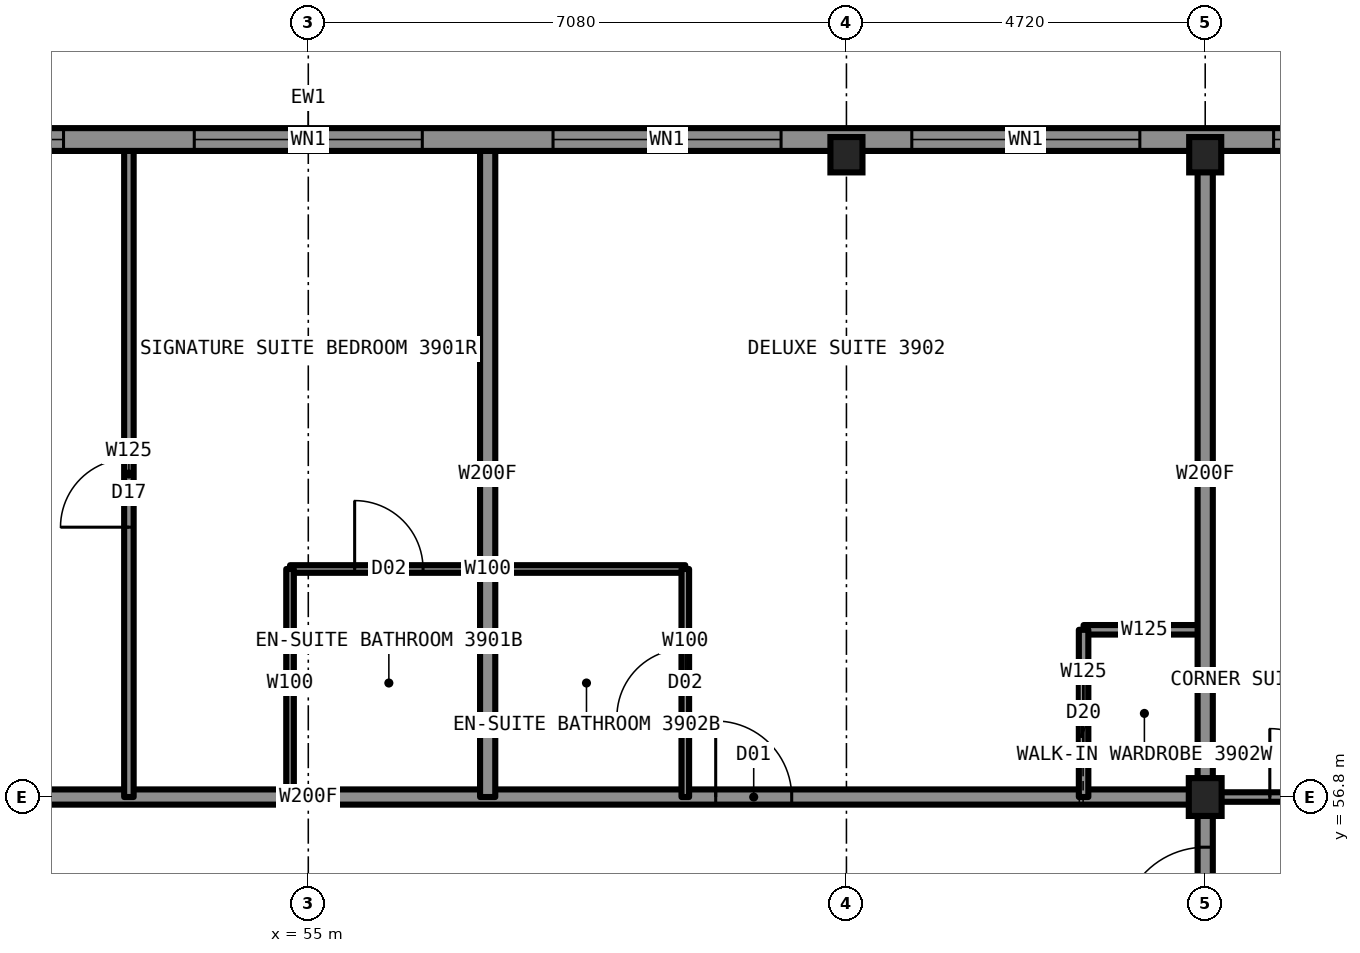
"""IFC4 building model, lengths in metres.
Left out: names, types, materials, properties, quantities, classifications, styles, units other than length and angle.
Written with IfcOpenShell. Run it as: python <this file> out.ifc"""

import sys

from ifc_helpers import new_model, si_unit, direction, frame, frame_2d, origin, origin_2d, place, context, subcontext, project, spatial, rectangle, i_section, extrude, element, fill, save


model = new_model("IFC4")
c1 = context("Model", 3, precision=1e-05, world=origin(), true_north=direction((0.0, 1.0)))
c2 = subcontext(c1, "Body", "Model", "MODEL_VIEW")
j1 = project(units=[si_unit("LENGTHUNIT", "METRE"), si_unit("PLANEANGLEUNIT", "RADIAN")], contexts=[c1])
p1 = place(None, origin())
s1 = spatial("IfcSite", under=j1, at=p1, CompositionType="ELEMENT")
p2 = place(p1, origin())
s2 = spatial("IfcBuilding", under=s1, at=p2, CompositionType="ELEMENT")
p3 = place(p2, frame((0.0, 0.0, 145.9)))
s3 = spatial("IfcBuildingStorey", under=s2, at=p3, CompositionType="ELEMENT", Elevation=145.9)
for number, where, z_axis, x_axis in (
    (1, (62.08, 65.25, 0.0), (0.0, 0.0, 1.0), (1.0, 0.0, 0.0)),
    (2, (66.8, 65.25, 0.0), (0.0, 0.0, 1.0), (1.0, 0.0, 0.0)),
):
    element("IfcColumn", number, at=place(p3, frame(where, z_axis=z_axis, x_axis=x_axis)), inside=s3, PredefinedType="COLUMN", context=c2, shape_type="SweptSolid", body=[
        extrude(i_section(OverallWidth=0.422, OverallDepth=0.465, WebThickness=0.045, FlangeThickness=0.073, at=origin_2d()), origin(), (0.0, 0.0, 1.0), 3.5),
    ])
p4 = place(p3, frame((66.8, 56.8, 0.0), z_axis=(0.0, 0.0, 1.0), x_axis=(1.0, 0.0, 0.0)))
e3 = element("IfcColumn", 3, at=p4, inside=s3, PredefinedType="COLUMN", context=c2, shape_type="SweptSolid", body=[
    extrude(i_section(OverallWidth=0.432, OverallDepth=0.498, WebThickness=0.056, FlangeThickness=0.089, at=origin_2d()), origin(), (0.0, 0.0, 1.0), 3.5),
])
p5 = place(p3, frame((43.2, 56.8, 0.0), z_axis=(0.0, 0.0, 1.0), x_axis=(1.0, 0.0, 0.0)))
e4 = element("IfcWall", 4, at=p5, inside=s3, PredefinedType="PARTITIONING", context=c2, shape_type="SweptSolid", body=[
    extrude(rectangle(XDim=23.6, YDim=0.2, at=frame_2d((11.8, 0.0))), origin(), (0.0, 0.0, 1.0), 3.33),
])
p6 = place(p5, frame((1.85, 0.0, 0.0)))
e5 = element("IfcOpeningElement", 5, at=p6, cuts=e4, PredefinedType="OPENING", context=c2, shape_type="SweptSolid", body=[
    extrude(rectangle(XDim=1.1, YDim=2.2, at=frame_2d((0.55, 1.1))), frame((0.0, 0.11, 0.0), z_axis=(0.0, -1.0, 0.0), x_axis=(1.0, 0.0, 0.0)), (0.0, 0.0, 1.0), 0.22),
])
p7 = place(p5, frame((17.16, 0.0, 0.0)))
e6 = element("IfcOpeningElement", 6, at=p7, cuts=e4, PredefinedType="OPENING", context=c2, shape_type="SweptSolid", body=[
    extrude(rectangle(XDim=1.0, YDim=2.2, at=frame_2d((0.5, 1.1))), frame((0.0, 0.11, 0.0), z_axis=(0.0, -1.0, 0.0), x_axis=(1.0, 0.0, 0.0)), (0.0, 0.0, 1.0), 0.22),
])
p8 = place(p3, frame((66.8, 56.8, 0.0), z_axis=(0.0, 0.0, 1.0), x_axis=(1.0, 0.0, 0.0)))
e7 = element("IfcWall", 7, at=p8, inside=s3, PredefinedType="PARTITIONING", context=c2, shape_type="SweptSolid", body=[
    extrude(rectangle(XDim=8.5, YDim=0.125, at=frame_2d((4.25, 0.0))), origin(), (0.0, 0.0, 1.0), 2.573),
])
p9 = place(p8, frame((0.85, 0.0, 0.0)))
e8 = element("IfcOpeningElement", 8, at=p9, cuts=e7, PredefinedType="OPENING", context=c2, shape_type="SweptSolid", body=[
    extrude(rectangle(XDim=0.9, YDim=2.2, at=frame_2d((0.45, 1.1))), frame((0.0, 0.073, 0.0), z_axis=(0.0, -1.0, 0.0), x_axis=(1.0, 0.0, 0.0)), (0.0, 0.0, 1.0), 0.145),
])
p10 = place(p3, frame((65.2, 59.0, 0.0), z_axis=(0.0, 0.0, 1.0), x_axis=(1.0, 0.0, 0.0)))
e9 = element("IfcWall", 9, at=p10, inside=s3, PredefinedType="PARTITIONING", context=c2, shape_type="SweptSolid", body=[
    extrude(rectangle(XDim=1.6, YDim=0.125, at=frame_2d((0.8, 0.0))), origin(), (0.0, 0.0, 1.0), 3.33),
])
p11 = place(p3, frame((54.76, 59.8, 0.0), z_axis=(0.0, 0.0, 1.0), x_axis=(1.0, 0.0, 0.0)))
e10 = element("IfcWall", 10, at=p11, inside=s3, PredefinedType="PARTITIONING", context=c2, shape_type="SweptSolid", body=[
    extrude(rectangle(XDim=5.2, YDim=0.1, at=frame_2d((2.6, 0.0))), origin(), (0.0, 0.0, 1.0), 3.33),
])
p12 = place(p11, frame((0.85, 0.0, 0.0)))
e11 = element("IfcOpeningElement", 11, at=p12, cuts=e10, PredefinedType="OPENING", context=c2, shape_type="SweptSolid", body=[
    extrude(rectangle(XDim=0.9, YDim=2.1, at=frame_2d((0.45, 1.05))), frame((0.0, 0.06, 0.0), z_axis=(0.0, -1.0, 0.0), x_axis=(1.0, 0.0, 0.0)), (0.0, 0.0, 1.0), 0.12),
])
p13 = place(p3, frame((54.76, 56.8, 0.0), z_axis=(0.0, 0.0, 1.0), x_axis=(0.0, 1.0, 0.0)))
e12 = element("IfcWall", 12, at=p13, inside=s3, PredefinedType="PARTITIONING", context=c2, shape_type="SweptSolid", body=[
    extrude(rectangle(XDim=3.0, YDim=0.1, at=frame_2d((1.5, 0.0))), origin(), (0.0, 0.0, 1.0), 3.33),
])
p14 = place(p3, frame((52.64, 56.8, 0.0), z_axis=(0.0, 0.0, 1.0), x_axis=(0.0, 1.0, 0.0)))
e13 = element("IfcWall", 13, at=p14, inside=s3, PredefinedType="PARTITIONING", context=c2, shape_type="SweptSolid", body=[
    extrude(rectangle(XDim=8.5, YDim=0.125, at=frame_2d((4.25, 0.0))), origin(), (0.0, 0.0, 1.0), 3.33),
])
p15 = place(p14, frame((3.55, 0.0, 0.0)))
e14 = element("IfcOpeningElement", 14, at=p15, cuts=e13, PredefinedType="OPENING", context=c2, shape_type="SweptSolid", body=[
    extrude(rectangle(XDim=0.9, YDim=2.2, at=frame_2d((0.45, 1.1))), frame((0.0, 0.073, 0.0), z_axis=(0.0, -1.0, 0.0), x_axis=(1.0, 0.0, 0.0)), (0.0, 0.0, 1.0), 0.145),
])
p16 = place(p3, frame((65.2, 56.8, 0.0), z_axis=(0.0, 0.0, 1.0), x_axis=(0.0, 1.0, 0.0)))
e15 = element("IfcWall", 15, at=p16, inside=s3, PredefinedType="PARTITIONING", context=c2, shape_type="SweptSolid", body=[
    extrude(rectangle(XDim=2.2, YDim=0.125, at=frame_2d((1.1, 0.0))), origin(), (0.0, 0.0, 1.0), 3.33),
])
p17 = place(p16, frame((0.7, 0.0, 0.0)))
e16 = element("IfcOpeningElement", 16, at=p17, cuts=e15, PredefinedType="OPENING", context=c2, shape_type="SweptSolid", body=[
    extrude(rectangle(XDim=0.8, YDim=2.1, at=frame_2d((0.4, 1.05))), frame((0.0, 0.073, 0.0), z_axis=(0.0, -1.0, 0.0), x_axis=(1.0, 0.0, 0.0)), (0.0, 0.0, 1.0), 0.145),
])
p18 = place(p3, frame((66.8, 33.2, 0.0), z_axis=(0.0, 0.0, 1.0), x_axis=(0.0, 1.0, 0.0)))
e17 = element("IfcWall", 17, at=p18, inside=s3, PredefinedType="PARTITIONING", context=c2, shape_type="SweptSolid", body=[
    extrude(rectangle(XDim=23.6, YDim=0.2, at=frame_2d((11.8, 0.0))), origin(), (0.0, 0.0, 1.0), 3.33),
])
p19 = place(p18, frame((7.87, 0.0, 0.0)))
e18 = element("IfcOpeningElement", 18, at=p19, cuts=e17, PredefinedType="OPENING", context=c2, shape_type="SweptSolid", body=[
    extrude(rectangle(XDim=1.0, YDim=2.2, at=frame_2d((0.5, 1.1))), frame((0.0, 0.11, 0.0), z_axis=(0.0, -1.0, 0.0), x_axis=(1.0, 0.0, 0.0)), (0.0, 0.0, 1.0), 0.22),
])
p20 = place(p18, frame((11.7, 0.0, 0.0)))
e19 = element("IfcOpeningElement", 19, at=p20, cuts=e17, PredefinedType="OPENING", context=c2, shape_type="SweptSolid", body=[
    extrude(rectangle(XDim=1.0, YDim=2.2, at=frame_2d((0.5, 1.1))), frame((0.0, 0.11, 0.0), z_axis=(0.0, -1.0, 0.0), x_axis=(1.0, 0.0, 0.0)), (0.0, 0.0, 1.0), 0.22),
])
p21 = place(p18, frame((14.56, 0.0, 0.0)))
e20 = element("IfcOpeningElement", 20, at=p21, cuts=e17, PredefinedType="OPENING", context=c2, shape_type="SweptSolid", body=[
    extrude(rectangle(XDim=1.0, YDim=2.2, at=frame_2d((0.5, 1.1))), frame((0.0, 0.11, 0.0), z_axis=(0.0, -1.0, 0.0), x_axis=(1.0, 0.0, 0.0)), (0.0, 0.0, 1.0), 0.22),
])
p22 = place(p18, frame((21.84, 0.0, 0.0)))
e21 = element("IfcOpeningElement", 21, at=p22, cuts=e17, PredefinedType="OPENING", context=c2, shape_type="SweptSolid", body=[
    extrude(rectangle(XDim=1.1, YDim=2.2, at=frame_2d((0.55, 1.1))), frame((0.0, 0.11, 0.0), z_axis=(0.0, -1.0, 0.0), x_axis=(1.0, 0.0, 0.0)), (0.0, 0.0, 1.0), 0.22),
])
p23 = place(p18, frame((0.66, 0.0, 0.0)))
e22 = element("IfcOpeningElement", 22, at=p23, cuts=e17, PredefinedType="OPENING", context=c2, shape_type="SweptSolid", body=[
    extrude(rectangle(XDim=1.1, YDim=2.2, at=frame_2d((0.55, 1.1))), frame((0.0, 0.11, 0.0), z_axis=(0.0, -1.0, 0.0), x_axis=(1.0, 0.0, 0.0)), (0.0, 0.0, 1.0), 0.22),
])
p24 = place(p3, frame((66.8, 56.8, 0.0), z_axis=(0.0, 0.0, 1.0), x_axis=(0.0, 1.0, 0.0)))
e23 = element("IfcWall", 23, at=p24, inside=s3, PredefinedType="PARTITIONING", context=c2, shape_type="SweptSolid", body=[
    extrude(rectangle(XDim=8.5, YDim=0.2, at=frame_2d((4.25, 0.0))), origin(), (0.0, 0.0, 1.0), 2.573),
])
p25 = place(p3, frame((57.36, 56.8, 0.0), z_axis=(0.0, 0.0, 1.0), x_axis=(0.0, 1.0, 0.0)))
e24 = element("IfcWall", 24, at=p25, inside=s3, PredefinedType="PARTITIONING", context=c2, shape_type="SweptSolid", body=[
    extrude(rectangle(XDim=8.5, YDim=0.2, at=frame_2d((4.25, 0.0))), origin(), (0.0, 0.0, 1.0), 3.33),
])
p26 = place(p3, frame((59.96, 56.8, 0.0), z_axis=(0.0, 0.0, 1.0), x_axis=(0.0, 1.0, 0.0)))
e25 = element("IfcWall", 25, at=p26, inside=s3, PredefinedType="PARTITIONING", context=c2, shape_type="SweptSolid", body=[
    extrude(rectangle(XDim=3.0, YDim=0.1, at=frame_2d((1.5, 0.0))), origin(), (0.0, 0.0, 1.0), 3.33),
])
p27 = place(p26, frame((1.05, 0.0, 0.0)))
e26 = element("IfcOpeningElement", 26, at=p27, cuts=e25, PredefinedType="OPENING", context=c2, shape_type="SweptSolid", body=[
    extrude(rectangle(XDim=0.9, YDim=2.1, at=frame_2d((0.45, 1.05))), frame((0.0, 0.06, 0.0), z_axis=(0.0, -1.0, 0.0), x_axis=(1.0, 0.0, 0.0)), (0.0, 0.0, 1.0), 0.12),
])
p28 = place(p3, frame((70.1, 65.45, 0.0), z_axis=(0.0, 0.0, 1.0), x_axis=(-1.0, 0.0, 0.0)))
e27 = element("IfcWall", 27, at=p28, inside=s3, PredefinedType="SOLIDWALL", context=c2, shape_type="SweptSolid", body=[
    extrude(rectangle(XDim=30.2, YDim=0.3, at=frame_2d((15.1, 0.0))), origin(), (0.0, 0.0, 1.0), 2.83),
])
p29 = place(p28, frame((1.3, 0.0, 0.8)))
e28 = element("IfcOpeningElement", 28, at=p29, cuts=e27, PredefinedType="OPENING", context=c2, shape_type="SweptSolid", body=[
    extrude(rectangle(XDim=1.1, YDim=1.7, at=frame_2d((0.55, 0.85))), frame((0.0, 0.16, 0.0), z_axis=(0.0, -1.0, 0.0), x_axis=(1.0, 0.0, 0.0)), (0.0, 0.0, 1.0), 0.32),
])
p30 = place(p28, frame((4.16, 0.0, 0.5)))
e29 = element("IfcOpeningElement", 29, at=p30, cuts=e27, PredefinedType="OPENING", context=c2, shape_type="SweptSolid", body=[
    extrude(rectangle(XDim=3.0, YDim=2.0, at=frame_2d((1.5, 1.0))), frame((0.0, 0.16, 0.0), z_axis=(0.0, -1.0, 0.0), x_axis=(1.0, 0.0, 0.0)), (0.0, 0.0, 1.0), 0.32),
])
p31 = place(p28, frame((8.88, 0.0, 0.5)))
e30 = element("IfcOpeningElement", 30, at=p31, cuts=e27, PredefinedType="OPENING", context=c2, shape_type="SweptSolid", body=[
    extrude(rectangle(XDim=3.0, YDim=2.0, at=frame_2d((1.5, 1.0))), frame((0.0, 0.16, 0.0), z_axis=(0.0, -1.0, 0.0), x_axis=(1.0, 0.0, 0.0)), (0.0, 0.0, 1.0), 0.32),
])
p32 = place(p28, frame((13.6, 0.0, 0.5)))
e31 = element("IfcOpeningElement", 31, at=p32, cuts=e27, PredefinedType="OPENING", context=c2, shape_type="SweptSolid", body=[
    extrude(rectangle(XDim=3.0, YDim=2.0, at=frame_2d((1.5, 1.0))), frame((0.0, 0.16, 0.0), z_axis=(0.0, -1.0, 0.0), x_axis=(1.0, 0.0, 0.0)), (0.0, 0.0, 1.0), 0.32),
])
p33 = place(p28, frame((18.32, 0.0, 0.5)))
e32 = element("IfcOpeningElement", 32, at=p33, cuts=e27, PredefinedType="OPENING", context=c2, shape_type="SweptSolid", body=[
    extrude(rectangle(XDim=3.0, YDim=2.0, at=frame_2d((1.5, 1.0))), frame((0.0, 0.16, 0.0), z_axis=(0.0, -1.0, 0.0), x_axis=(1.0, 0.0, 0.0)), (0.0, 0.0, 1.0), 0.32),
])
p34 = place(p28, frame((23.04, 0.0, 0.5)))
e33 = element("IfcOpeningElement", 33, at=p34, cuts=e27, PredefinedType="OPENING", context=c2, shape_type="SweptSolid", body=[
    extrude(rectangle(XDim=3.0, YDim=2.0, at=frame_2d((1.5, 1.0))), frame((0.0, 0.16, 0.0), z_axis=(0.0, -1.0, 0.0), x_axis=(1.0, 0.0, 0.0)), (0.0, 0.0, 1.0), 0.32),
])
p35 = place(p28, frame((27.75, 0.0, 0.8)))
e34 = element("IfcOpeningElement", 34, at=p35, cuts=e27, PredefinedType="OPENING", context=c2, shape_type="SweptSolid", body=[
    extrude(rectangle(XDim=1.1, YDim=1.7, at=frame_2d((0.55, 0.85))), frame((0.0, 0.16, 0.0), z_axis=(0.0, -1.0, 0.0), x_axis=(1.0, 0.0, 0.0)), (0.0, 0.0, 1.0), 0.32),
])
p36 = place(p12, origin())
e35 = element("IfcDoor", 35, at=p36, inside=s3, OperationType="SINGLE_SWING_RIGHT", PredefinedType="DOOR", context=c2, shape_type="SweptSolid", body=[
    extrude(rectangle(XDim=0.9, YDim=2.1, at=frame_2d((0.45, 1.05))), frame((0.0, 0.025, 0.0), z_axis=(0.0, -1.0, 0.0), x_axis=(1.0, 0.0, 0.0)), (0.0, 0.0, 1.0), 0.05),
])
fill(e11, e35)
p37 = place(p15, origin())
e36 = element("IfcDoor", 36, at=p37, inside=s3, OperationType="SINGLE_SWING_LEFT", PredefinedType="DOOR", context=c2, shape_type="SweptSolid", body=[
    extrude(rectangle(XDim=0.9, YDim=2.2, at=frame_2d((0.45, 1.1))), frame((0.0, 0.025, 0.0), z_axis=(0.0, -1.0, 0.0), x_axis=(1.0, 0.0, 0.0)), (0.0, 0.0, 1.0), 0.05),
])
fill(e14, e36)
p38 = place(p7, origin())
e37 = element("IfcDoor", 37, at=p38, inside=s3, OperationType="SINGLE_SWING_LEFT", PredefinedType="DOOR", context=c2, shape_type="SweptSolid", body=[
    extrude(rectangle(XDim=1.0, YDim=2.2, at=frame_2d((0.5, 1.1))), frame((0.0, 0.025, 0.0), z_axis=(0.0, -1.0, 0.0), x_axis=(1.0, 0.0, 0.0)), (0.0, 0.0, 1.0), 0.05),
])
fill(e6, e37)
p39 = place(p27, origin())
e38 = element("IfcDoor", 38, at=p39, inside=s3, OperationType="SINGLE_SWING_RIGHT", PredefinedType="DOOR", context=c2, shape_type="SweptSolid", body=[
    extrude(rectangle(XDim=0.9, YDim=2.1, at=frame_2d((0.45, 1.05))), frame((0.0, 0.025, 0.0), z_axis=(0.0, -1.0, 0.0), x_axis=(1.0, 0.0, 0.0)), (0.0, 0.0, 1.0), 0.05),
])
fill(e26, e38)
p40 = place(p17, origin())
e39 = element("IfcDoor", 39, at=p40, inside=s3, OperationType="SLIDING_TO_LEFT", PredefinedType="DOOR", context=c2, shape_type="SweptSolid", body=[
    extrude(rectangle(XDim=0.8, YDim=2.1, at=frame_2d((0.4, 1.05))), frame((0.0, 0.025, 0.0), z_axis=(0.0, -1.0, 0.0), x_axis=(1.0, 0.0, 0.0)), (0.0, 0.0, 1.0), 0.05),
])
fill(e16, e39)
p41 = place(p9, origin())
e40 = element("IfcDoor", 40, at=p41, inside=s3, OperationType="SINGLE_SWING_LEFT", PredefinedType="DOOR", context=c2, shape_type="SweptSolid", body=[
    extrude(rectangle(XDim=0.9, YDim=2.2, at=frame_2d((0.45, 1.1))), frame((0.0, 0.025, 0.0), z_axis=(0.0, -1.0, 0.0), x_axis=(1.0, 0.0, 0.0)), (0.0, 0.0, 1.0), 0.05),
])
fill(e8, e40)
p42 = place(p22, origin())
e41 = element("IfcDoor", 41, at=p42, inside=s3, OperationType="SINGLE_SWING_LEFT", PredefinedType="DOOR", context=c2, shape_type="SweptSolid", body=[
    extrude(rectangle(XDim=1.1, YDim=2.2, at=frame_2d((0.55, 1.1))), frame((0.0, 0.025, 0.0), z_axis=(0.0, -1.0, 0.0), x_axis=(1.0, 0.0, 0.0)), (0.0, 0.0, 1.0), 0.05),
])
fill(e21, e41)
p43 = place(p29, origin())
e42 = element("IfcWindow", 42, at=p43, inside=s3, PartitioningType="SINGLE_PANEL", PredefinedType="WINDOW", context=c2, shape_type="SweptSolid", body=[
    extrude(rectangle(XDim=1.1, YDim=1.7, at=frame_2d((0.55, 0.85))), frame((0.0, 0.03, 0.0), z_axis=(0.0, -1.0, 0.0), x_axis=(1.0, 0.0, 0.0)), (0.0, 0.0, 1.0), 0.06),
])
fill(e28, e42)
p44 = place(p30, origin())
e43 = element("IfcWindow", 43, at=p44, inside=s3, PartitioningType="SINGLE_PANEL", PredefinedType="WINDOW", context=c2, shape_type="SweptSolid", body=[
    extrude(rectangle(XDim=3.0, YDim=2.0, at=frame_2d((1.5, 1.0))), frame((0.0, 0.03, 0.0), z_axis=(0.0, -1.0, 0.0), x_axis=(1.0, 0.0, 0.0)), (0.0, 0.0, 1.0), 0.06),
])
fill(e29, e43)
p45 = place(p31, origin())
e44 = element("IfcWindow", 44, at=p45, inside=s3, PartitioningType="SINGLE_PANEL", PredefinedType="WINDOW", context=c2, shape_type="SweptSolid", body=[
    extrude(rectangle(XDim=3.0, YDim=2.0, at=frame_2d((1.5, 1.0))), frame((0.0, 0.03, 0.0), z_axis=(0.0, -1.0, 0.0), x_axis=(1.0, 0.0, 0.0)), (0.0, 0.0, 1.0), 0.06),
])
fill(e30, e44)
p46 = place(p32, origin())
e45 = element("IfcWindow", 45, at=p46, inside=s3, PartitioningType="SINGLE_PANEL", PredefinedType="WINDOW", context=c2, shape_type="SweptSolid", body=[
    extrude(rectangle(XDim=3.0, YDim=2.0, at=frame_2d((1.5, 1.0))), frame((0.0, 0.03, 0.0), z_axis=(0.0, -1.0, 0.0), x_axis=(1.0, 0.0, 0.0)), (0.0, 0.0, 1.0), 0.06),
])
fill(e31, e45)
p47 = place(p33, origin())
e46 = element("IfcWindow", 46, at=p47, inside=s3, PartitioningType="SINGLE_PANEL", PredefinedType="WINDOW", context=c2, shape_type="SweptSolid", body=[
    extrude(rectangle(XDim=3.0, YDim=2.0, at=frame_2d((1.5, 1.0))), frame((0.0, 0.03, 0.0), z_axis=(0.0, -1.0, 0.0), x_axis=(1.0, 0.0, 0.0)), (0.0, 0.0, 1.0), 0.06),
])
fill(e32, e46)
save(model, sys.argv[1])
